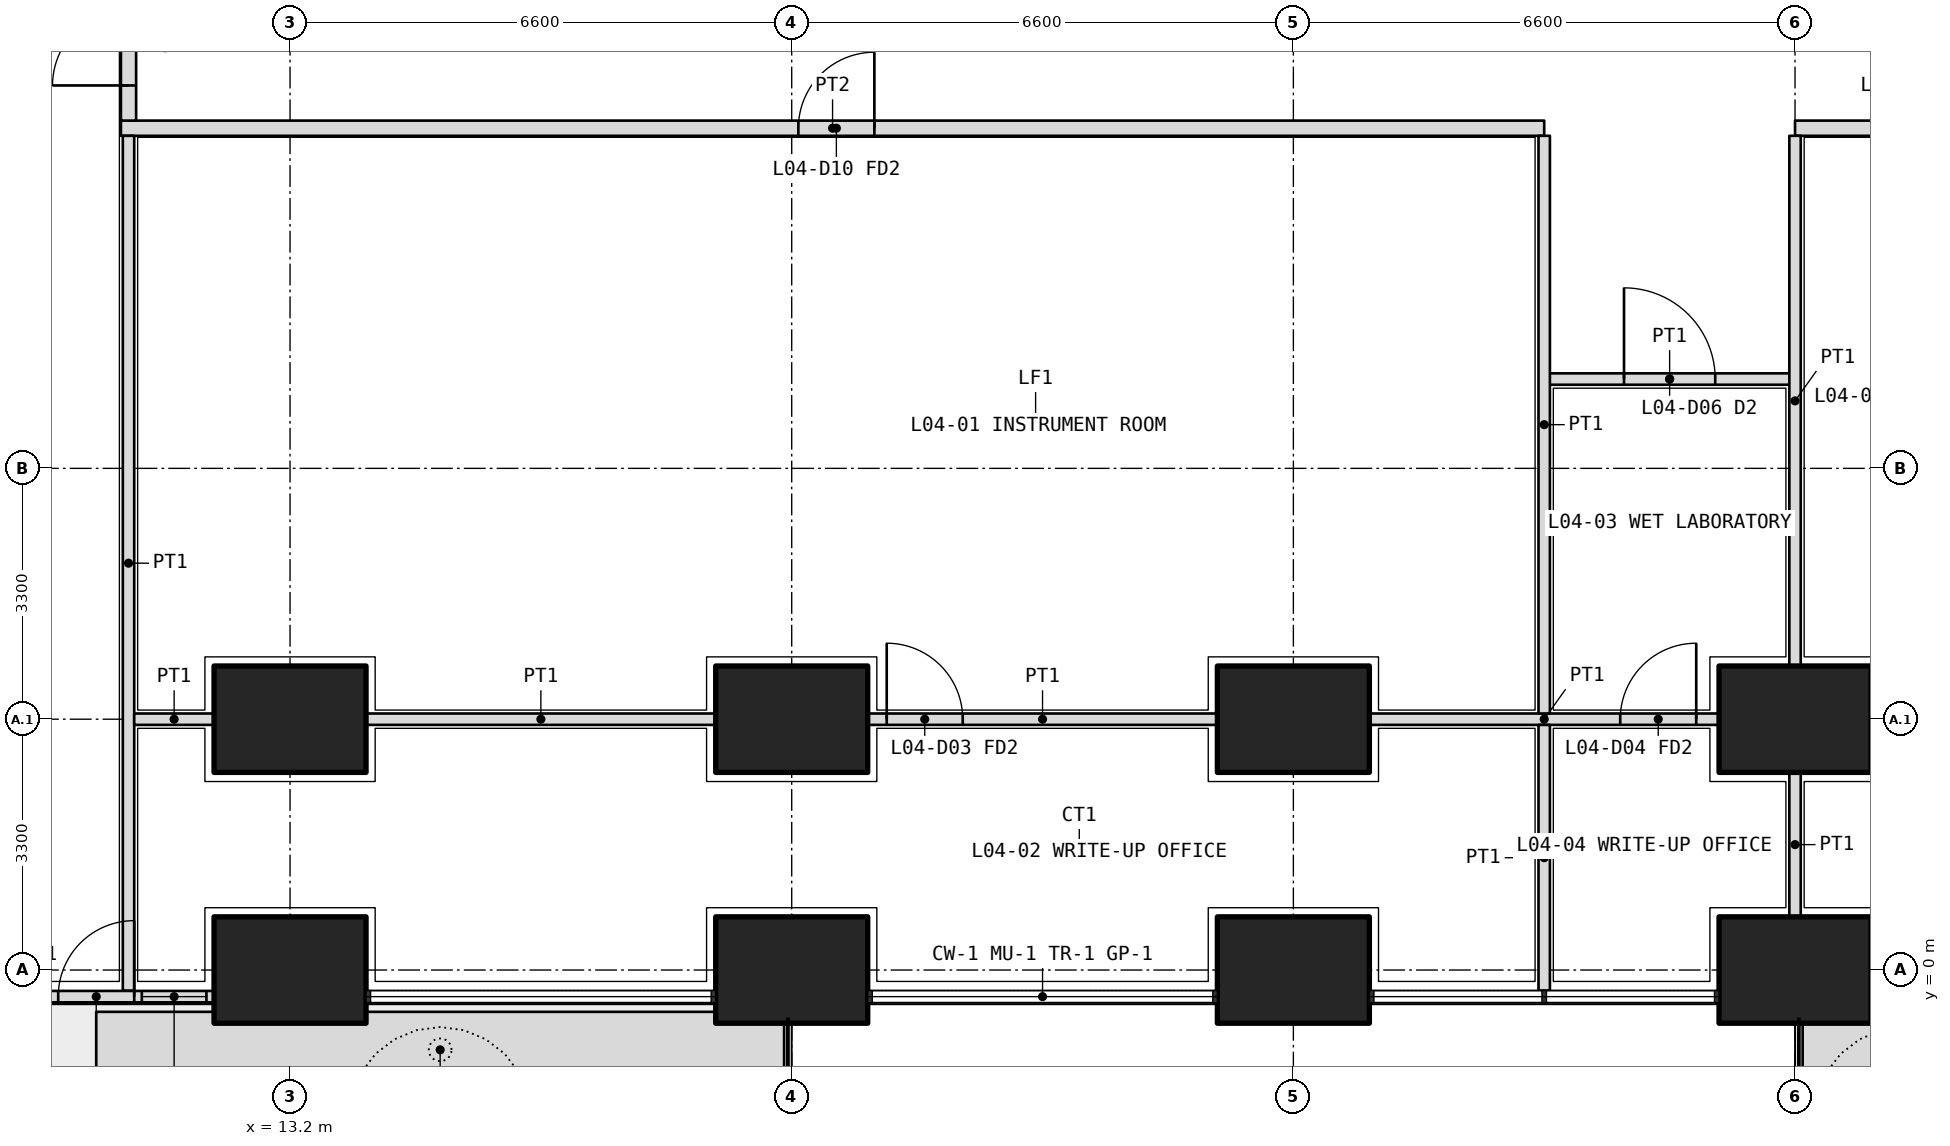
"""IFC4 building model, lengths in metres.
Left out: names, types, materials, properties, quantities, classifications, styles, units other than length and angle.
Written with IfcOpenShell. Run it as: python <this file> out.ifc"""

import sys

from ifc_helpers import new_model, si_unit, direction, frame, frame_2d, origin, origin_2d, place, context, subcontext, project, spatial, polyline, rectangle, outline, extrude, element, fill, save


model = new_model("IFC4")
c1 = context("Model", 3, precision=1e-05, world=origin(), true_north=direction((0.0, 1.0)))
c2 = subcontext(c1, "Body", "Model", "MODEL_VIEW")
j1 = project(units=[si_unit("LENGTHUNIT", "METRE"), si_unit("PLANEANGLEUNIT", "RADIAN")], contexts=[c1])
p1 = place(None, origin())
s1 = spatial("IfcSite", under=j1, at=p1, CompositionType="ELEMENT")
p2 = place(p1, origin())
s2 = spatial("IfcBuilding", under=s1, at=p2, CompositionType="ELEMENT")
p3 = place(p2, frame((0.0, 0.0, 21.3)))
s3 = spatial("IfcBuildingStorey", under=s2, at=p3, CompositionType="ELEMENT", Elevation=21.3)
for number, where, z_axis, x_axis in (
    (1, (13.2, 0.0, 0.0), (0.0, 0.0, 1.0), (1.0, 0.0, 0.0)),
    (2, (19.8, 0.0, 0.0), (0.0, 0.0, 1.0), (1.0, 0.0, 0.0)),
    (3, (26.4, 0.0, 0.0), (0.0, 0.0, 1.0), (1.0, 0.0, 0.0)),
    (4, (33.0, 0.0, 0.0), (0.0, 0.0, 1.0), (1.0, 0.0, 0.0)),
    (5, (13.2, 3.3, 0.0), (0.0, 0.0, 1.0), (1.0, 0.0, 0.0)),
    (6, (19.8, 3.3, 0.0), (0.0, 0.0, 1.0), (1.0, 0.0, 0.0)),
    (7, (26.4, 3.3, 0.0), (0.0, 0.0, 1.0), (1.0, 0.0, 0.0)),
    (8, (33.0, 3.3, 0.0), (0.0, 0.0, 1.0), (1.0, 0.0, 0.0)),
):
    element("IfcColumn", number, at=place(p3, frame(where, z_axis=z_axis, x_axis=x_axis)), inside=s3, PredefinedType="COLUMN", context=c2, shape_type="SweptSolid", body=[
        extrude(rectangle(XDim=2.0, YDim=1.4, at=origin_2d()), origin(), (0.0, 0.0, 1.0), 4.2),
    ])
p4 = place(p3, origin())
e9 = element("IfcWall", 9, at=p4, inside=s3, PredefinedType="USERDEFINED", context=c2, shape_type="SweptSolid", body=[
    extrude(outline(polyline([(10.65, -1.55), (19.7, -1.55), (19.7, -0.55), (10.65, -0.55), (10.65, -1.55)]), holes=[polyline([(10.8, -1.4), (19.55, -1.4), (19.55, -0.7), (10.8, -0.7), (10.8, -1.4)])]), origin(), (0.0, 0.0, 1.0), 1.05),
])
p5 = place(p3, origin())
e10 = element("IfcWall", 10, at=p5, inside=s3, PredefinedType="USERDEFINED", context=c2, shape_type="SweptSolid", body=[
    extrude(outline(polyline([(33.1, -1.55), (35.55, -1.55), (35.55, -0.55), (33.1, -0.55), (33.1, -1.55)]), holes=[polyline([(33.25, -1.4), (35.4, -1.4), (35.4, -0.7), (33.25, -0.7), (33.25, -1.4)])]), origin(), (0.0, 0.0, 1.0), 1.05),
])
p6 = place(p3, frame((7.6, -0.35, 0.0), z_axis=(0.0, 0.0, 1.0), x_axis=(1.0, 0.0, 0.0)))
e11 = element("IfcWall", 11, at=p6, inside=s3, PredefinedType="SOLIDWALL", context=c2, shape_type="SweptSolid", body=[
    extrude(rectangle(XDim=4.6, YDim=0.15, at=frame_2d((2.3, 0.0))), origin(), (0.0, 0.0, 1.0), 2.7),
])
p7 = place(p6, frame((2.55, 0.0, 0.0)))
e12 = element("IfcOpeningElement", 12, at=p7, cuts=e11, PredefinedType="OPENING", context=c2, shape_type="SweptSolid", body=[
    extrude(rectangle(XDim=1.0, YDim=2.4, at=frame_2d((0.5, 1.2))), frame((0.0, 0.085, 0.0), z_axis=(0.0, -1.0, 0.0), x_axis=(1.0, 0.0, 0.0)), (0.0, 0.0, 1.0), 0.17),
])
p8 = place(p6, frame((0.1, 0.0, 0.1)))
e13 = element("IfcOpeningElement", 13, at=p8, cuts=e11, PredefinedType="OPENING", context=c2, shape_type="SweptSolid", body=[
    extrude(rectangle(XDim=1.95, YDim=2.3, at=frame_2d((0.975, 1.15))), frame((0.0, 0.085, 0.0), z_axis=(0.0, -1.0, 0.0), x_axis=(1.0, 0.0, 0.0)), (0.0, 0.0, 1.0), 0.17),
])
p9 = place(p6, frame((3.65, 0.0, 0.1)))
e14 = element("IfcOpeningElement", 14, at=p9, cuts=e11, PredefinedType="OPENING", context=c2, shape_type="SweptSolid", body=[
    extrude(rectangle(XDim=0.85, YDim=2.3, at=frame_2d((0.425, 1.15))), frame((0.0, 0.085, 0.0), z_axis=(0.0, -1.0, 0.0), x_axis=(1.0, 0.0, 0.0)), (0.0, 0.0, 1.0), 0.17),
])
p10 = place(p3, frame((10.975, 11.075, 0.0), z_axis=(0.0, 0.0, 1.0), x_axis=(1.0, 0.0, 0.0)))
e15 = element("IfcWall", 15, at=p10, inside=s3, PredefinedType="PARTITIONING", context=c2, shape_type="SweptSolid", body=[
    extrude(rectangle(XDim=18.725, YDim=0.2, at=frame_2d((9.362, 0.0))), origin(), (0.0, 0.0, 1.0), 2.85),
])
p11 = place(p10, frame((8.913, 0.0, 0.0)))
e16 = element("IfcOpeningElement", 16, at=p11, cuts=e15, PredefinedType="OPENING", context=c2, shape_type="SweptSolid", body=[
    extrude(rectangle(XDim=1.0, YDim=2.1, at=frame_2d((0.5, 1.05))), frame((0.0, 0.11, 0.0), z_axis=(0.0, -1.0, 0.0), x_axis=(1.0, 0.0, 0.0)), (0.0, 0.0, 1.0), 0.22),
])
p12 = place(p3, frame((33.0, 11.075, 0.0), z_axis=(0.0, 0.0, 1.0), x_axis=(1.0, 0.0, 0.0)))
e17 = element("IfcWall", 17, at=p12, inside=s3, PredefinedType="PARTITIONING", context=c2, shape_type="SweptSolid", body=[
    extrude(rectangle(XDim=8.825, YDim=0.2, at=frame_2d((4.413, 0.0))), origin(), (0.0, 0.0, 1.0), 2.85),
])
p13 = place(p12, frame((1.2, 0.0, 0.0)))
e18 = element("IfcOpeningElement", 18, at=p13, cuts=e17, PredefinedType="OPENING", context=c2, shape_type="SweptSolid", body=[
    extrude(rectangle(XDim=1.0, YDim=2.1, at=frame_2d((0.5, 1.05))), frame((0.0, 0.11, 0.0), z_axis=(0.0, -1.0, 0.0), x_axis=(1.0, 0.0, 0.0)), (0.0, 0.0, 1.0), 0.22),
])
p14 = place(p12, frame((4.5, 0.0, 0.0)))
e19 = element("IfcOpeningElement", 19, at=p14, cuts=e17, PredefinedType="OPENING", context=c2, shape_type="SweptSolid", body=[
    extrude(rectangle(XDim=1.0, YDim=2.1, at=frame_2d((0.5, 1.05))), frame((0.0, 0.11, 0.0), z_axis=(0.0, -1.0, 0.0), x_axis=(1.0, 0.0, 0.0)), (0.0, 0.0, 1.0), 0.22),
])
p15 = place(p12, frame((7.163, 0.0, 0.0)))
e20 = element("IfcOpeningElement", 20, at=p15, cuts=e17, PredefinedType="OPENING", context=c2, shape_type="SweptSolid", body=[
    extrude(rectangle(XDim=1.0, YDim=2.1, at=frame_2d((0.5, 1.05))), frame((0.0, 0.11, 0.0), z_axis=(0.0, -1.0, 0.0), x_axis=(1.0, 0.0, 0.0)), (0.0, 0.0, 1.0), 0.22),
])
p16 = place(p3, frame((11.075, 11.175, 0.0), z_axis=(0.0, 0.0, 1.0), x_axis=(0.0, 1.0, 0.0)))
e21 = element("IfcWall", 21, at=p16, inside=s3, PredefinedType="PARTITIONING", context=c2, shape_type="SweptSolid", body=[
    extrude(rectangle(XDim=23.85, YDim=0.2, at=frame_2d((11.925, 0.0))), origin(), (0.0, 0.0, 1.0), 2.85),
])
p17 = place(p16, frame((0.462, 0.0, 0.0)))
e22 = element("IfcOpeningElement", 22, at=p17, cuts=e21, PredefinedType="OPENING", context=c2, shape_type="SweptSolid", body=[
    extrude(rectangle(XDim=1.0, YDim=2.1, at=frame_2d((0.5, 1.05))), frame((0.0, 0.11, 0.0), z_axis=(0.0, -1.0, 0.0), x_axis=(1.0, 0.0, 0.0)), (0.0, 0.0, 1.0), 0.22),
])
p18 = place(p16, frame((2.575, 0.0, 0.0)))
e23 = element("IfcOpeningElement", 23, at=p18, cuts=e21, PredefinedType="OPENING", context=c2, shape_type="SweptSolid", body=[
    extrude(rectangle(XDim=1.0, YDim=2.1, at=frame_2d((0.5, 1.05))), frame((0.0, 0.11, 0.0), z_axis=(0.0, -1.0, 0.0), x_axis=(1.0, 0.0, 0.0)), (0.0, 0.0, 1.0), 0.22),
])
p19 = place(p16, frame((5.625, 0.0, 0.0)))
e24 = element("IfcOpeningElement", 24, at=p19, cuts=e21, PredefinedType="OPENING", context=c2, shape_type="SweptSolid", body=[
    extrude(rectangle(XDim=0.9, YDim=2.1, at=frame_2d((0.45, 1.05))), frame((0.0, 0.11, 0.0), z_axis=(0.0, -1.0, 0.0), x_axis=(1.0, 0.0, 0.0)), (0.0, 0.0, 1.0), 0.22),
])
p20 = place(p16, frame((9.425, 0.0, 0.0)))
e25 = element("IfcOpeningElement", 25, at=p20, cuts=e21, PredefinedType="OPENING", context=c2, shape_type="SweptSolid", body=[
    extrude(rectangle(XDim=0.9, YDim=2.1, at=frame_2d((0.45, 1.05))), frame((0.0, 0.11, 0.0), z_axis=(0.0, -1.0, 0.0), x_axis=(1.0, 0.0, 0.0)), (0.0, 0.0, 1.0), 0.22),
])
p21 = place(p16, frame((12.975, 0.0, 0.0)))
e26 = element("IfcOpeningElement", 26, at=p21, cuts=e21, PredefinedType="OPENING", context=c2, shape_type="SweptSolid", body=[
    extrude(rectangle(XDim=1.0, YDim=2.1, at=frame_2d((0.5, 1.05))), frame((0.0, 0.11, 0.0), z_axis=(0.0, -1.0, 0.0), x_axis=(1.0, 0.0, 0.0)), (0.0, 0.0, 1.0), 0.22),
])
p22 = place(p16, frame((16.375, 0.0, 0.0)))
e27 = element("IfcOpeningElement", 27, at=p22, cuts=e21, PredefinedType="OPENING", context=c2, shape_type="SweptSolid", body=[
    extrude(rectangle(XDim=1.0, YDim=2.1, at=frame_2d((0.5, 1.05))), frame((0.0, 0.11, 0.0), z_axis=(0.0, -1.0, 0.0), x_axis=(1.0, 0.0, 0.0)), (0.0, 0.0, 1.0), 0.22),
])
p23 = place(p16, frame((20.738, 0.0, 0.0)))
e28 = element("IfcOpeningElement", 28, at=p23, cuts=e21, PredefinedType="OPENING", context=c2, shape_type="SweptSolid", body=[
    extrude(rectangle(XDim=1.0, YDim=2.1, at=frame_2d((0.5, 1.05))), frame((0.0, 0.11, 0.0), z_axis=(0.0, -1.0, 0.0), x_axis=(1.0, 0.0, 0.0)), (0.0, 0.0, 1.0), 0.22),
])
p24 = place(p3, frame((11.075, -0.27, 0.0), z_axis=(0.0, 0.0, 1.0), x_axis=(0.0, 1.0, 0.0)))
e29 = element("IfcWall", 29, at=p24, inside=s3, PredefinedType="PARTITIONING", context=c2, shape_type="SweptSolid", body=[
    extrude(rectangle(XDim=11.245, YDim=0.15, at=frame_2d((5.623, 0.0))), origin(), (0.0, 0.0, 1.0), 2.7),
])
p25 = place(p3, frame((11.15, 3.3, 0.0), z_axis=(0.0, 0.0, 1.0), x_axis=(1.0, 0.0, 0.0)))
e30 = element("IfcWall", 30, at=p25, inside=s3, PredefinedType="PARTITIONING", context=c2, shape_type="SweptSolid", body=[
    extrude(rectangle(XDim=1.05, YDim=0.15, at=frame_2d((0.525, 0.0))), origin(), (0.0, 0.0, 1.0), 3.9),
])
p26 = place(p3, frame((14.2, 3.3, 0.0), z_axis=(0.0, 0.0, 1.0), x_axis=(1.0, 0.0, 0.0)))
e31 = element("IfcWall", 31, at=p26, inside=s3, PredefinedType="PARTITIONING", context=c2, shape_type="SweptSolid", body=[
    extrude(rectangle(XDim=4.6, YDim=0.15, at=frame_2d((2.3, 0.0))), origin(), (0.0, 0.0, 1.0), 3.9),
])
p27 = place(p3, frame((20.8, 3.3, 0.0), z_axis=(0.0, 0.0, 1.0), x_axis=(1.0, 0.0, 0.0)))
e32 = element("IfcWall", 32, at=p27, inside=s3, PredefinedType="PARTITIONING", context=c2, shape_type="SweptSolid", body=[
    extrude(rectangle(XDim=4.6, YDim=0.15, at=frame_2d((2.3, 0.0))), origin(), (0.0, 0.0, 1.0), 3.9),
])
p28 = place(p27, frame((0.25, 0.0, 0.0)))
e33 = element("IfcOpeningElement", 33, at=p28, cuts=e32, PredefinedType="OPENING", context=c2, shape_type="SweptSolid", body=[
    extrude(rectangle(XDim=1.0, YDim=2.1, at=frame_2d((0.5, 1.05))), frame((0.0, 0.085, 0.0), z_axis=(0.0, -1.0, 0.0), x_axis=(1.0, 0.0, 0.0)), (0.0, 0.0, 1.0), 0.17),
])
p29 = place(p3, frame((27.4, 3.3, 0.0), z_axis=(0.0, 0.0, 1.0), x_axis=(1.0, 0.0, 0.0)))
e34 = element("IfcWall", 34, at=p29, inside=s3, PredefinedType="PARTITIONING", context=c2, shape_type="SweptSolid", body=[
    extrude(rectangle(XDim=4.6, YDim=0.15, at=frame_2d((2.3, 0.0))), origin(), (0.0, 0.0, 1.0), 3.9),
])
p30 = place(p29, frame((3.3, 0.0, 0.0)))
e35 = element("IfcOpeningElement", 35, at=p30, cuts=e34, PredefinedType="OPENING", context=c2, shape_type="SweptSolid", body=[
    extrude(rectangle(XDim=1.0, YDim=2.1, at=frame_2d((0.5, 1.05))), frame((0.0, 0.085, 0.0), z_axis=(0.0, -1.0, 0.0), x_axis=(1.0, 0.0, 0.0)), (0.0, 0.0, 1.0), 0.17),
])
p31 = place(p3, frame((29.7, 7.775, 0.0), z_axis=(0.0, 0.0, 1.0), x_axis=(1.0, 0.0, 0.0)))
e36 = element("IfcWall", 36, at=p31, inside=s3, PredefinedType="PARTITIONING", context=c2, shape_type="SweptSolid", body=[
    extrude(rectangle(XDim=3.3, YDim=0.15, at=frame_2d((1.65, 0.0))), origin(), (0.0, 0.0, 1.0), 2.85),
])
p32 = place(p31, frame((1.05, 0.0, 0.0)))
e37 = element("IfcOpeningElement", 37, at=p32, cuts=e36, PredefinedType="OPENING", context=c2, shape_type="SweptSolid", body=[
    extrude(rectangle(XDim=1.2, YDim=2.1, at=frame_2d((0.6, 1.05))), frame((0.0, 0.085, 0.0), z_axis=(0.0, -1.0, 0.0), x_axis=(1.0, 0.0, 0.0)), (0.0, 0.0, 1.0), 0.17),
])
p33 = place(p3, frame((29.7, -0.27, 0.0), z_axis=(0.0, 0.0, 1.0), x_axis=(0.0, 1.0, 0.0)))
e38 = element("IfcWall", 38, at=p33, inside=s3, PredefinedType="PARTITIONING", context=c2, shape_type="SweptSolid", body=[
    extrude(rectangle(XDim=3.495, YDim=0.15, at=frame_2d((1.748, 0.0))), origin(), (0.0, 0.0, 1.0), 2.7),
])
p34 = place(p3, frame((29.7, 3.375, 0.0), z_axis=(0.0, 0.0, 1.0), x_axis=(0.0, 1.0, 0.0)))
e39 = element("IfcWall", 39, at=p34, inside=s3, PredefinedType="PARTITIONING", context=c2, shape_type="SweptSolid", body=[
    extrude(rectangle(XDim=7.6, YDim=0.15, at=frame_2d((3.8, 0.0))), origin(), (0.0, 0.0, 1.0), 3.9),
])
p35 = place(p3, frame((33.0, 0.7, 0.0), z_axis=(0.0, 0.0, 1.0), x_axis=(0.0, 1.0, 0.0)))
e40 = element("IfcWall", 40, at=p35, inside=s3, PredefinedType="PARTITIONING", context=c2, shape_type="SweptSolid", body=[
    extrude(rectangle(XDim=1.9, YDim=0.15, at=frame_2d((0.95, 0.0))), origin(), (0.0, 0.0, 1.0), 2.85),
])
p36 = place(p3, frame((33.0, 4.0, 0.0), z_axis=(0.0, 0.0, 1.0), x_axis=(0.0, 1.0, 0.0)))
e41 = element("IfcWall", 41, at=p36, inside=s3, PredefinedType="PARTITIONING", context=c2, shape_type="SweptSolid", body=[
    extrude(rectangle(XDim=6.975, YDim=0.15, at=frame_2d((3.488, 0.0))), origin(), (0.0, 0.0, 1.0), 2.85),
])
p37 = place(p7, origin())
e42 = element("IfcDoor", 42, at=p37, inside=s3, OperationType="SINGLE_SWING_RIGHT", PredefinedType="DOOR", context=c2, shape_type="SweptSolid", body=[
    extrude(rectangle(XDim=1.0, YDim=2.4, at=frame_2d((0.5, 1.2))), frame((0.0, 0.025, 0.0), z_axis=(0.0, -1.0, 0.0), x_axis=(1.0, 0.0, 0.0)), (0.0, 0.0, 1.0), 0.05),
])
fill(e12, e42)
p38 = place(p9, origin())
e43 = element("IfcWindow", 43, at=p38, inside=s3, PartitioningType="SINGLE_PANEL", PredefinedType="WINDOW", context=c2, shape_type="SweptSolid", body=[
    extrude(rectangle(XDim=0.85, YDim=2.3, at=frame_2d((0.425, 1.15))), frame((0.0, 0.03, 0.0), z_axis=(0.0, -1.0, 0.0), x_axis=(1.0, 0.0, 0.0)), (0.0, 0.0, 1.0), 0.06),
])
fill(e14, e43)
p39 = place(p11, origin())
e44 = element("IfcDoor", 44, at=p39, inside=s3, OperationType="SINGLE_SWING_RIGHT", PredefinedType="DOOR", context=c2, shape_type="SweptSolid", body=[
    extrude(rectangle(XDim=1.0, YDim=2.1, at=frame_2d((0.5, 1.05))), frame((0.0, 0.025, 0.0), z_axis=(0.0, -1.0, 0.0), x_axis=(1.0, 0.0, 0.0)), (0.0, 0.0, 1.0), 0.05),
])
fill(e16, e44)
p40 = place(p28, origin())
e45 = element("IfcDoor", 45, at=p40, inside=s3, OperationType="SINGLE_SWING_LEFT", PredefinedType="DOOR", context=c2, shape_type="SweptSolid", body=[
    extrude(rectangle(XDim=1.0, YDim=2.1, at=frame_2d((0.5, 1.05))), frame((0.0, 0.025, 0.0), z_axis=(0.0, -1.0, 0.0), x_axis=(1.0, 0.0, 0.0)), (0.0, 0.0, 1.0), 0.05),
])
fill(e33, e45)
p41 = place(p32, origin())
e46 = element("IfcDoor", 46, at=p41, inside=s3, OperationType="DOUBLE_DOOR_SINGLE_SWING", PredefinedType="DOOR", context=c2, shape_type="SweptSolid", body=[
    extrude(rectangle(XDim=1.2, YDim=2.1, at=frame_2d((0.6, 1.05))), frame((0.0, 0.025, 0.0), z_axis=(0.0, -1.0, 0.0), x_axis=(1.0, 0.0, 0.0)), (0.0, 0.0, 1.0), 0.05),
])
fill(e37, e46)
p42 = place(p30, origin())
e47 = element("IfcDoor", 47, at=p42, inside=s3, OperationType="SINGLE_SWING_RIGHT", PredefinedType="DOOR", context=c2, shape_type="SweptSolid", body=[
    extrude(rectangle(XDim=1.0, YDim=2.1, at=frame_2d((0.5, 1.05))), frame((0.0, 0.025, 0.0), z_axis=(0.0, -1.0, 0.0), x_axis=(1.0, 0.0, 0.0)), (0.0, 0.0, 1.0), 0.05),
])
fill(e35, e47)
p43 = place(p17, origin())
e48 = element("IfcDoor", 48, at=p43, inside=s3, OperationType="SINGLE_SWING_LEFT", PredefinedType="DOOR", context=c2, shape_type="SweptSolid", body=[
    extrude(rectangle(XDim=1.0, YDim=2.1, at=frame_2d((0.5, 1.05))), frame((0.0, 0.025, 0.0), z_axis=(0.0, -1.0, 0.0), x_axis=(1.0, 0.0, 0.0)), (0.0, 0.0, 1.0), 0.05),
])
fill(e22, e48)
save(model, sys.argv[1])
